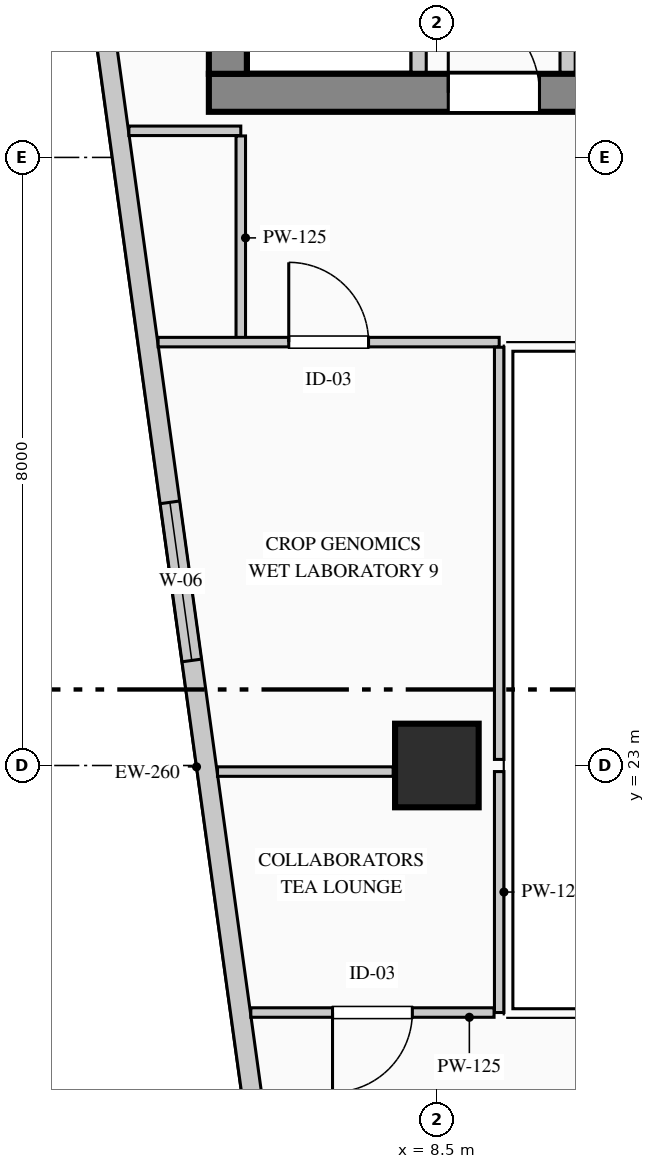
"""IFC4 building model, lengths in metres.
Left out: names, types, materials, properties, quantities, classifications, styles, units other than length and angle.
Written with IfcOpenShell. Run it as: python <this file> out.ifc"""

import sys

from ifc_helpers import new_model, si_unit, direction, frame, frame_2d, origin, origin_2d, place, context, subcontext, project, spatial, rectangle, extrude, element, fill, save


model = new_model("IFC4")
c1 = context("Model", 3, precision=1e-05, world=origin(), true_north=direction((0.0, 1.0)))
c2 = subcontext(c1, "Body", "Model", "MODEL_VIEW")
j1 = project(units=[si_unit("LENGTHUNIT", "METRE"), si_unit("PLANEANGLEUNIT", "RADIAN")], contexts=[c1])
p1 = place(None, origin())
s1 = spatial("IfcSite", under=j1, at=p1, CompositionType="ELEMENT")
p2 = place(p1, origin())
s2 = spatial("IfcBuilding", under=s1, at=p2, CompositionType="ELEMENT")
p3 = place(p2, frame((0.0, 0.0, 115.35)))
s3 = spatial("IfcBuildingStorey", under=s2, at=p3, CompositionType="ELEMENT", Elevation=115.35)
p4 = place(p3, frame((5.5, 31.85, 0.0), z_axis=(0.0, 0.0, 1.0), x_axis=(1.0, 0.0, 0.0)))
e1 = element("IfcWall", 1, at=p4, inside=s3, PredefinedType="SHEAR", context=c2, shape_type="SweptSolid", body=[
    extrude(rectangle(XDim=17.85, YDim=0.5, at=frame_2d((8.925, 0.0))), origin(), (0.0, 0.0, 1.0), 3.95),
])
p5 = place(p4, frame((3.15, 0.0, 0.0)))
e2 = element("IfcOpeningElement", 2, at=p5, cuts=e1, PredefinedType="OPENING", context=c2, shape_type="SweptSolid", body=[
    extrude(rectangle(XDim=1.2, YDim=2.2, at=frame_2d((0.6, 1.1))), frame((0.0, 0.26, 0.0), z_axis=(0.0, -1.0, 0.0), x_axis=(1.0, 0.0, 0.0)), (0.0, 0.0, 1.0), 0.52),
])
p6 = place(p4, frame((7.0, 0.0, 0.0)))
e3 = element("IfcOpeningElement", 3, at=p6, cuts=e1, PredefinedType="OPENING", context=c2, shape_type="SweptSolid", body=[
    extrude(rectangle(XDim=1.2, YDim=2.2, at=frame_2d((0.6, 1.1))), frame((0.0, 0.26, 0.0), z_axis=(0.0, -1.0, 0.0), x_axis=(1.0, 0.0, 0.0)), (0.0, 0.0, 1.0), 0.52),
])
p7 = place(p4, frame((8.85, 0.0, 0.0)))
e4 = element("IfcOpeningElement", 4, at=p7, cuts=e1, PredefinedType="OPENING", context=c2, shape_type="SweptSolid", body=[
    extrude(rectangle(XDim=1.15, YDim=2.2, at=frame_2d((0.575, 1.1))), frame((0.0, 0.26, 0.0), z_axis=(0.0, -1.0, 0.0), x_axis=(1.0, 0.0, 0.0)), (0.0, 0.0, 1.0), 0.52),
])
p8 = place(p4, frame((15.95, 0.0, 0.0)))
e5 = element("IfcOpeningElement", 5, at=p8, cuts=e1, PredefinedType="OPENING", context=c2, shape_type="SweptSolid", body=[
    extrude(rectangle(XDim=1.2, YDim=2.2, at=frame_2d((0.6, 1.1))), frame((0.0, 0.26, 0.0), z_axis=(0.0, -1.0, 0.0), x_axis=(1.0, 0.0, 0.0)), (0.0, 0.0, 1.0), 0.52),
])
p9 = place(p3, frame((5.75, 32.1, 0.0), z_axis=(0.0, 0.0, 1.0), x_axis=(0.0, 1.0, 0.0)))
e6 = element("IfcWall", 6, at=p9, inside=s3, PredefinedType="SHEAR", context=c2, shape_type="SweptSolid", body=[
    extrude(rectangle(XDim=8.3, YDim=0.5, at=frame_2d((4.15, 0.0))), origin(), (0.0, 0.0, 1.0), 3.95),
])
p10 = place(p3, frame((8.5, 23.0, 0.0), z_axis=(0.0, 0.0, 1.0), x_axis=(1.0, 0.0, 0.0)))
e7 = element("IfcColumn", 7, at=p10, inside=s3, PredefinedType="COLUMN", context=c2, shape_type="SweptSolid", body=[
    extrude(rectangle(XDim=1.1, YDim=1.1, at=origin_2d()), origin(), (0.0, 0.0, 1.0), 3.95),
])
p11 = place(p3, frame((7.993, 4.73, 0.0), z_axis=(0.0, 0.0, 1.0), x_axis=(-0.136989009016, 0.990572567462, 0.0)))
e8 = element("IfcWall", 8, at=p11, inside=s3, PredefinedType="STANDARD", context=c2, shape_type="SweptSolid", body=[
    extrude(rectangle(XDim=36.888, YDim=0.26, at=frame_2d((18.444, 0.0))), origin(), (0.0, 0.0, 1.0), 3.69),
])
p12 = place(p11, frame((19.839, 0.0, 0.9)))
e9 = element("IfcOpeningElement", 9, at=p12, cuts=e8, PredefinedType="OPENING", context=c2, shape_type="SweptSolid", body=[
    extrude(rectangle(XDim=2.1, YDim=2.0, at=frame_2d((1.05, 1.0))), frame((0.0, 0.14, 0.0), z_axis=(0.0, -1.0, 0.0), x_axis=(1.0, 0.0, 0.0)), (0.0, 0.0, 1.0), 0.28),
])
p13 = place(p3, frame((8.26, 32.12, 0.0), z_axis=(0.0, 0.0, 1.0), x_axis=(0.0, 1.0, 0.0)))
e10 = element("IfcWall", 10, at=p13, inside=s3, PredefinedType="PARTITIONING", context=c2, shape_type="SweptSolid", body=[
    extrude(rectangle(XDim=7.5, YDim=0.2, at=frame_2d((3.75, 0.0))), origin(), (0.0, 0.0, 1.0), 3.69),
])
p14 = place(p3, frame((10.22, 32.12, 0.0), z_axis=(0.0, 0.0, 1.0), x_axis=(0.0, 1.0, 0.0)))
e11 = element("IfcWall", 11, at=p14, inside=s3, PredefinedType="PARTITIONING", context=c2, shape_type="SweptSolid", body=[
    extrude(rectangle(XDim=8.26, YDim=0.2, at=frame_2d((4.13, 0.0))), origin(), (0.0, 0.0, 1.0), 3.69),
])
p15 = place(p3, frame((9.32, 22.92, 0.0), z_axis=(0.0, 0.0, 1.0), x_axis=(0.0, -1.0, 0.0)))
e12 = element("IfcWall", 12, at=p15, inside=s3, PredefinedType="PARTITIONING", context=c2, shape_type="SweptSolid", body=[
    extrude(rectangle(XDim=3.17, YDim=0.125, at=frame_2d((1.585, 0.0))), origin(), (0.0, 0.0, 1.0), 3.315),
])
p16 = place(p3, frame((9.252, 19.75, 0.0), z_axis=(0.0, 0.0, 1.0), x_axis=(-1.0, 0.0, 0.0)))
e13 = element("IfcWall", 13, at=p16, inside=s3, PredefinedType="PARTITIONING", context=c2, shape_type="SweptSolid", body=[
    extrude(rectangle(XDim=3.2, YDim=0.125, at=frame_2d((1.6, 0.0))), origin(), (0.0, 0.0, 1.0), 3.69),
])
p17 = place(p16, frame((1.075, 0.0, 0.0)))
e14 = element("IfcOpeningElement", 14, at=p17, cuts=e13, PredefinedType="OPENING", context=c2, shape_type="SweptSolid", body=[
    extrude(rectangle(XDim=1.05, YDim=2.15, at=frame_2d((0.525, 1.075))), frame((0.0, 0.073, 0.0), z_axis=(0.0, -1.0, 0.0), x_axis=(1.0, 0.0, 0.0)), (0.0, 0.0, 1.0), 0.145),
])
p18 = place(p3, frame((5.614, 22.92, 0.0), z_axis=(0.0, 0.0, 1.0), x_axis=(1.0, 0.0, 0.0)))
e15 = element("IfcWall", 15, at=p18, inside=s3, PredefinedType="PARTITIONING", context=c2, shape_type="SweptSolid", body=[
    extrude(rectangle(XDim=2.312, YDim=0.125, at=frame_2d((1.156, 0.0))), origin(), (0.0, 0.0, 1.0), 3.69),
])
p19 = place(p3, frame((4.448, 31.35, 0.0), z_axis=(0.0, 0.0, 1.0), x_axis=(1.0, 0.0, 0.0)))
e16 = element("IfcWall", 16, at=p19, inside=s3, PredefinedType="PARTITIONING", context=c2, shape_type="SweptSolid", body=[
    extrude(rectangle(XDim=1.472, YDim=0.125, at=frame_2d((0.736, 0.0))), origin(), (0.0, 0.0, 1.0), 3.69),
])
p20 = place(p3, frame((5.92, 31.282, 0.0), z_axis=(0.0, 0.0, 1.0), x_axis=(0.0, -1.0, 0.0)))
e17 = element("IfcWall", 17, at=p20, inside=s3, PredefinedType="PARTITIONING", context=c2, shape_type="SweptSolid", body=[
    extrude(rectangle(XDim=2.682, YDim=0.125, at=frame_2d((1.341, 0.0))), origin(), (0.0, 0.0, 1.0), 3.69),
])
p21 = place(p3, frame((4.832, 28.57, 0.0), z_axis=(0.0, 0.0, 1.0), x_axis=(1.0, 0.0, 0.0)))
e18 = element("IfcWall", 18, at=p21, inside=s3, PredefinedType="PARTITIONING", context=c2, shape_type="SweptSolid", body=[
    extrude(rectangle(XDim=4.488, YDim=0.125, at=frame_2d((2.244, 0.0))), origin(), (0.0, 0.0, 1.0), 3.69),
])
p22 = place(p21, frame((1.719, 0.0, 0.0)))
e19 = element("IfcOpeningElement", 19, at=p22, cuts=e18, PredefinedType="OPENING", context=c2, shape_type="SweptSolid", body=[
    extrude(rectangle(XDim=1.05, YDim=2.15, at=frame_2d((0.525, 1.075))), frame((0.0, 0.073, 0.0), z_axis=(0.0, -1.0, 0.0), x_axis=(1.0, 0.0, 0.0)), (0.0, 0.0, 1.0), 0.145),
])
p23 = place(p3, frame((9.32, 28.502, 0.0), z_axis=(0.0, 0.0, 1.0), x_axis=(0.0, -1.0, 0.0)))
e20 = element("IfcWall", 20, at=p23, inside=s3, PredefinedType="PARTITIONING", context=c2, shape_type="SweptSolid", body=[
    extrude(rectangle(XDim=5.422, YDim=0.125, at=frame_2d((2.711, 0.0))), origin(), (0.0, 0.0, 1.0), 3.315),
])
p24 = place(p12, origin())
e21 = element("IfcWindow", 21, at=p24, inside=s3, PartitioningType="DOUBLE_PANEL_VERTICAL", PredefinedType="WINDOW", context=c2, shape_type="SweptSolid", body=[
    extrude(rectangle(XDim=2.1, YDim=2.0, at=frame_2d((1.05, 1.0))), frame((0.0, 0.03, 0.0), z_axis=(0.0, -1.0, 0.0), x_axis=(1.0, 0.0, 0.0)), (0.0, 0.0, 1.0), 0.06),
])
fill(e9, e21)
p25 = place(p5, origin())
e22 = element("IfcDoor", 22, at=p25, inside=s3, OperationType="SINGLE_SWING_LEFT", PredefinedType="DOOR", context=c2, shape_type="SweptSolid", body=[
    extrude(rectangle(XDim=1.2, YDim=2.2, at=frame_2d((0.6, 1.1))), frame((0.0, 0.025, 0.0), z_axis=(0.0, -1.0, 0.0), x_axis=(1.0, 0.0, 0.0)), (0.0, 0.0, 1.0), 0.05),
])
fill(e2, e22)
p26 = place(p17, origin())
e23 = element("IfcDoor", 23, at=p26, inside=s3, OperationType="SINGLE_SWING_RIGHT", PredefinedType="DOOR", context=c2, shape_type="SweptSolid", body=[
    extrude(rectangle(XDim=1.05, YDim=2.15, at=frame_2d((0.525, 1.075))), frame((0.0, 0.025, 0.0), z_axis=(0.0, -1.0, 0.0), x_axis=(1.0, 0.0, 0.0)), (0.0, 0.0, 1.0), 0.05),
])
fill(e14, e23)
p27 = place(p22, origin())
e24 = element("IfcDoor", 24, at=p27, inside=s3, OperationType="SINGLE_SWING_LEFT", PredefinedType="DOOR", context=c2, shape_type="SweptSolid", body=[
    extrude(rectangle(XDim=1.05, YDim=2.15, at=frame_2d((0.525, 1.075))), frame((0.0, 0.025, 0.0), z_axis=(0.0, -1.0, 0.0), x_axis=(1.0, 0.0, 0.0)), (0.0, 0.0, 1.0), 0.05),
])
fill(e19, e24)
save(model, sys.argv[1])
